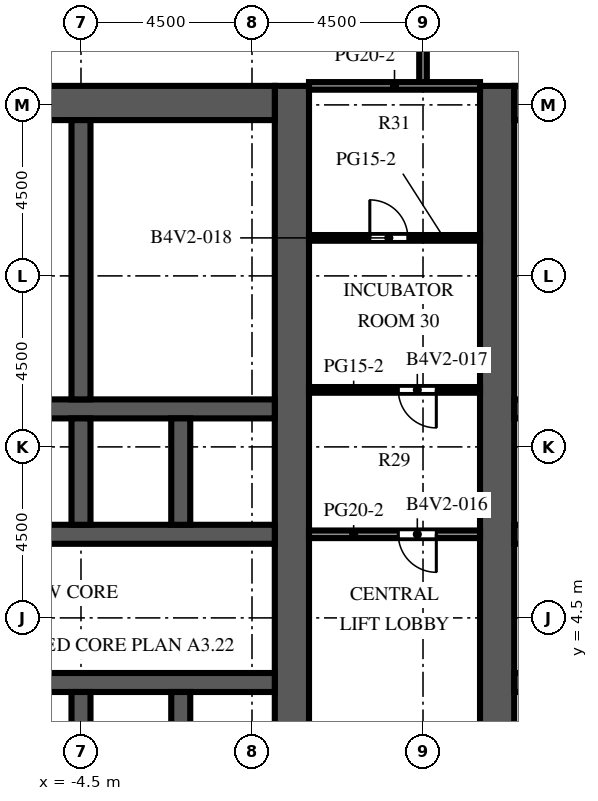
"""IFC4 building model, lengths in metres.
Left out: names, types, materials, properties, quantities, classifications, styles, units other than length and angle.
Written with IfcOpenShell. Run it as: python <this file> out.ifc"""

import sys

from ifc_helpers import new_model, si_unit, direction, frame, frame_2d, origin, place, context, subcontext, project, spatial, rectangle, extrude, element, fill, save


model = new_model("IFC4")
c1 = context("Model", 3, precision=1e-05, world=origin(), true_north=direction((0.0, 1.0)))
c2 = subcontext(c1, "Body", "Model", "MODEL_VIEW")
j1 = project(units=[si_unit("LENGTHUNIT", "METRE"), si_unit("PLANEANGLEUNIT", "RADIAN")], contexts=[c1])
p1 = place(None, origin())
s1 = spatial("IfcSite", under=j1, at=p1, CompositionType="ELEMENT")
p2 = place(p1, origin())
s2 = spatial("IfcBuilding", under=s1, at=p2, CompositionType="ELEMENT")
p3 = place(p2, frame((0.0, 0.0, 141.3)))
s3 = spatial("IfcBuildingStorey", under=s2, at=p3, CompositionType="ELEMENT", Elevation=141.3)
p4 = place(p3, frame((1.05, -9.0, 0.0), z_axis=(0.0, 0.0, 1.0), x_axis=(0.0, 1.0, 0.0)))
e1 = element("IfcWall", 1, at=p4, inside=s3, PredefinedType="SHEAR", context=c2, shape_type="SweptSolid", body=[
    extrude(rectangle(XDim=27.5, YDim=0.9, at=frame_2d((13.75, 0.0))), origin(), (0.0, 0.0, 1.0), 4.1),
])
p5 = place(p4, frame((12.55, 0.0, 0.0)))
e2 = element("IfcOpeningElement", 2, at=p5, cuts=e1, PredefinedType="OPENING", context=c2, shape_type="SweptSolid", body=[
    extrude(rectangle(XDim=2.4, YDim=2.4, at=frame_2d((1.2, 1.2))), frame((0.0, 0.46, 0.0), z_axis=(0.0, -1.0, 0.0), x_axis=(1.0, 0.0, 0.0)), (0.0, 0.0, 1.0), 0.92),
])
p6 = place(p4, frame((5.51, 0.0, 0.0)))
e3 = element("IfcOpeningElement", 3, at=p6, cuts=e1, PredefinedType="OPENING", context=c2, shape_type="SweptSolid", body=[
    extrude(rectangle(XDim=0.923, YDim=2.1, at=frame_2d((0.461, 1.05))), frame((0.0, 0.46, 0.0), z_axis=(0.0, -1.0, 0.0), x_axis=(1.0, 0.0, 0.0)), (0.0, 0.0, 1.0), 0.92),
])
p7 = place(p4, frame((23.427, 0.0, 0.0)))
e4 = element("IfcOpeningElement", 4, at=p7, cuts=e1, PredefinedType="OPENING", context=c2, shape_type="SweptSolid", body=[
    extrude(rectangle(XDim=1.2, YDim=2.1, at=frame_2d((0.6, 1.05))), frame((0.0, 0.46, 0.0), z_axis=(0.0, -1.0, 0.0), x_axis=(1.0, 0.0, 0.0)), (0.0, 0.0, 1.0), 0.92),
])
p8 = place(p3, frame((-9.6, 18.05, 0.0), z_axis=(0.0, 0.0, 1.0), x_axis=(1.0, 0.0, 0.0)))
e5 = element("IfcWall", 5, at=p8, inside=s3, PredefinedType="SHEAR", context=c2, shape_type="SweptSolid", body=[
    extrude(rectangle(XDim=10.2, YDim=0.9, at=frame_2d((5.1, 0.0))), origin(), (0.0, 0.0, 1.0), 4.1),
])
p9 = place(p3, frame((-9.6, 2.8, 0.0), z_axis=(0.0, 0.0, 1.0), x_axis=(1.0, 0.0, 0.0)))
e6 = element("IfcWall", 6, at=p9, inside=s3, PredefinedType="SHEAR", context=c2, shape_type="SweptSolid", body=[
    extrude(rectangle(XDim=10.2, YDim=0.5, at=frame_2d((5.1, 0.0))), origin(), (0.0, 0.0, 1.0), 4.1),
])
p10 = place(p9, frame((0.562, 0.0, 0.0)))
e7 = element("IfcOpeningElement", 7, at=p10, cuts=e6, PredefinedType="OPENING", context=c2, shape_type="SweptSolid", body=[
    extrude(rectangle(XDim=1.1, YDim=2.1, at=frame_2d((0.55, 1.05))), frame((0.0, 0.26, 0.0), z_axis=(0.0, -1.0, 0.0), x_axis=(1.0, 0.0, 0.0)), (0.0, 0.0, 1.0), 0.52),
])
p11 = place(p9, frame((3.238, 0.0, 0.0)))
e8 = element("IfcOpeningElement", 8, at=p11, cuts=e6, PredefinedType="OPENING", context=c2, shape_type="SweptSolid", body=[
    extrude(rectangle(XDim=1.1, YDim=2.1, at=frame_2d((0.55, 1.05))), frame((0.0, 0.26, 0.0), z_axis=(0.0, -1.0, 0.0), x_axis=(1.0, 0.0, 0.0)), (0.0, 0.0, 1.0), 0.52),
])
p12 = place(p9, frame((8.538, 0.0, 0.0)))
e9 = element("IfcOpeningElement", 9, at=p12, cuts=e6, PredefinedType="OPENING", context=c2, shape_type="SweptSolid", body=[
    extrude(rectangle(XDim=1.1, YDim=2.1, at=frame_2d((0.55, 1.05))), frame((0.0, 0.26, 0.0), z_axis=(0.0, -1.0, 0.0), x_axis=(1.0, 0.0, 0.0)), (0.0, 0.0, 1.0), 0.52),
])
p13 = place(p3, frame((-9.6, 6.7, 0.0), z_axis=(0.0, 0.0, 1.0), x_axis=(1.0, 0.0, 0.0)))
e10 = element("IfcWall", 10, at=p13, inside=s3, PredefinedType="SHEAR", context=c2, shape_type="SweptSolid", body=[
    extrude(rectangle(XDim=10.2, YDim=0.5, at=frame_2d((5.1, 0.0))), origin(), (0.0, 0.0, 1.0), 4.1),
])
p14 = place(p13, frame((0.562, 0.0, 0.0)))
e11 = element("IfcOpeningElement", 11, at=p14, cuts=e10, PredefinedType="OPENING", context=c2, shape_type="SweptSolid", body=[
    extrude(rectangle(XDim=1.1, YDim=2.1, at=frame_2d((0.55, 1.05))), frame((0.0, 0.26, 0.0), z_axis=(0.0, -1.0, 0.0), x_axis=(1.0, 0.0, 0.0)), (0.0, 0.0, 1.0), 0.52),
])
p15 = place(p13, frame((3.288, 0.0, 0.0)))
e12 = element("IfcOpeningElement", 12, at=p15, cuts=e10, PredefinedType="OPENING", context=c2, shape_type="SweptSolid", body=[
    extrude(rectangle(XDim=1.0, YDim=2.1, at=frame_2d((0.5, 1.05))), frame((0.0, 0.26, 0.0), z_axis=(0.0, -1.0, 0.0), x_axis=(1.0, 0.0, 0.0)), (0.0, 0.0, 1.0), 0.52),
])
p16 = place(p13, frame((5.913, 0.0, 0.0)))
e13 = element("IfcOpeningElement", 13, at=p16, cuts=e10, PredefinedType="OPENING", context=c2, shape_type="SweptSolid", body=[
    extrude(rectangle(XDim=1.0, YDim=2.1, at=frame_2d((0.5, 1.05))), frame((0.0, 0.26, 0.0), z_axis=(0.0, -1.0, 0.0), x_axis=(1.0, 0.0, 0.0)), (0.0, 0.0, 1.0), 0.52),
])
p17 = place(p13, frame((8.587, 0.0, 0.0)))
e14 = element("IfcOpeningElement", 14, at=p17, cuts=e10, PredefinedType="OPENING", context=c2, shape_type="SweptSolid", body=[
    extrude(rectangle(XDim=1.0, YDim=2.1, at=frame_2d((0.5, 1.05))), frame((0.0, 0.26, 0.0), z_axis=(0.0, -1.0, 0.0), x_axis=(1.0, 0.0, 0.0)), (0.0, 0.0, 1.0), 0.52),
])
p18 = place(p3, frame((-9.6, 10.0, 0.0), z_axis=(0.0, 0.0, 1.0), x_axis=(1.0, 0.0, 0.0)))
e15 = element("IfcWall", 15, at=p18, inside=s3, PredefinedType="SHEAR", context=c2, shape_type="SweptSolid", body=[
    extrude(rectangle(XDim=10.2, YDim=0.5, at=frame_2d((5.1, 0.0))), origin(), (0.0, 0.0, 1.0), 4.1),
])
for number, where, z_axis, x_axis in (
    (16, (-4.5, -0.25, 0.0), (0.0, 0.0, 1.0), (0.0, 1.0, 0.0)),
    (17, (-4.5, 6.95, 0.0), (0.0, 0.0, 1.0), (0.0, 1.0, 0.0)),
    (18, (-1.875, -0.25, 0.0), (0.0, 0.0, 1.0), (0.0, 1.0, 0.0)),
    (19, (-1.875, 6.95, 0.0), (0.0, 0.0, 1.0), (0.0, 1.0, 0.0)),
):
    element("IfcWall", number, at=place(p3, frame(where, z_axis=z_axis, x_axis=x_axis)), inside=s3, PredefinedType="SHEAR", context=c2, shape_type="SweptSolid", body=[
        extrude(rectangle(XDim=2.8, YDim=0.5, at=frame_2d((1.4, 0.0))), origin(), (0.0, 0.0, 1.0), 4.1),
    ])
p19 = place(p3, frame((-4.5, 10.25, 0.0), z_axis=(0.0, 0.0, 1.0), x_axis=(0.0, 1.0, 0.0)))
e20 = element("IfcWall", 20, at=p19, inside=s3, PredefinedType="SHEAR", context=c2, shape_type="SweptSolid", body=[
    extrude(rectangle(XDim=7.35, YDim=0.5, at=frame_2d((3.675, 0.0))), origin(), (0.0, 0.0, 1.0), 4.1),
])
p20 = place(p3, frame((6.45, -9.0, 0.0), z_axis=(0.0, 0.0, 1.0), x_axis=(0.0, 1.0, 0.0)))
e21 = element("IfcWall", 21, at=p20, inside=s3, PredefinedType="SHEAR", context=c2, shape_type="SweptSolid", body=[
    extrude(rectangle(XDim=27.5, YDim=0.9, at=frame_2d((13.75, 0.0))), origin(), (0.0, 0.0, 1.0), 4.1),
])
p21 = place(p20, frame((12.55, 0.0, 0.0)))
e22 = element("IfcOpeningElement", 22, at=p21, cuts=e21, PredefinedType="OPENING", context=c2, shape_type="SweptSolid", body=[
    extrude(rectangle(XDim=2.4, YDim=2.4, at=frame_2d((1.2, 1.2))), frame((0.0, 0.46, 0.0), z_axis=(0.0, -1.0, 0.0), x_axis=(1.0, 0.0, 0.0)), (0.0, 0.0, 1.0), 0.92),
])
p22 = place(p20, frame((5.51, 0.0, 0.0)))
e23 = element("IfcOpeningElement", 23, at=p22, cuts=e21, PredefinedType="OPENING", context=c2, shape_type="SweptSolid", body=[
    extrude(rectangle(XDim=0.923, YDim=2.1, at=frame_2d((0.461, 1.05))), frame((0.0, 0.46, 0.0), z_axis=(0.0, -1.0, 0.0), x_axis=(1.0, 0.0, 0.0)), (0.0, 0.0, 1.0), 0.92),
])
p23 = place(p20, frame((23.427, 0.0, 0.0)))
e24 = element("IfcOpeningElement", 24, at=p23, cuts=e21, PredefinedType="OPENING", context=c2, shape_type="SweptSolid", body=[
    extrude(rectangle(XDim=1.2, YDim=2.1, at=frame_2d((0.6, 1.05))), frame((0.0, 0.46, 0.0), z_axis=(0.0, -1.0, 0.0), x_axis=(1.0, 0.0, 0.0)), (0.0, 0.0, 1.0), 0.92),
])
p24 = place(p3, frame((6.9, 18.05, 0.0), z_axis=(0.0, 0.0, 1.0), x_axis=(1.0, 0.0, 0.0)))
e25 = element("IfcWall", 25, at=p24, inside=s3, PredefinedType="SHEAR", context=c2, shape_type="SweptSolid", body=[
    extrude(rectangle(XDim=10.2, YDim=0.9, at=frame_2d((5.1, 0.0))), origin(), (0.0, 0.0, 1.0), 4.1),
])
p25 = place(p3, frame((6.9, 2.8, 0.0), z_axis=(0.0, 0.0, 1.0), x_axis=(1.0, 0.0, 0.0)))
e26 = element("IfcWall", 26, at=p25, inside=s3, PredefinedType="SHEAR", context=c2, shape_type="SweptSolid", body=[
    extrude(rectangle(XDim=10.2, YDim=0.5, at=frame_2d((5.1, 0.0))), origin(), (0.0, 0.0, 1.0), 4.1),
])
p26 = place(p25, frame((0.562, 0.0, 0.0)))
e27 = element("IfcOpeningElement", 27, at=p26, cuts=e26, PredefinedType="OPENING", context=c2, shape_type="SweptSolid", body=[
    extrude(rectangle(XDim=1.1, YDim=2.1, at=frame_2d((0.55, 1.05))), frame((0.0, 0.26, 0.0), z_axis=(0.0, -1.0, 0.0), x_axis=(1.0, 0.0, 0.0)), (0.0, 0.0, 1.0), 0.52),
])
p27 = place(p25, frame((3.238, 0.0, 0.0)))
e28 = element("IfcOpeningElement", 28, at=p27, cuts=e26, PredefinedType="OPENING", context=c2, shape_type="SweptSolid", body=[
    extrude(rectangle(XDim=1.1, YDim=2.1, at=frame_2d((0.55, 1.05))), frame((0.0, 0.26, 0.0), z_axis=(0.0, -1.0, 0.0), x_axis=(1.0, 0.0, 0.0)), (0.0, 0.0, 1.0), 0.52),
])
p28 = place(p25, frame((8.538, 0.0, 0.0)))
e29 = element("IfcOpeningElement", 29, at=p28, cuts=e26, PredefinedType="OPENING", context=c2, shape_type="SweptSolid", body=[
    extrude(rectangle(XDim=1.1, YDim=2.1, at=frame_2d((0.55, 1.05))), frame((0.0, 0.26, 0.0), z_axis=(0.0, -1.0, 0.0), x_axis=(1.0, 0.0, 0.0)), (0.0, 0.0, 1.0), 0.52),
])
p29 = place(p3, frame((6.9, 6.7, 0.0), z_axis=(0.0, 0.0, 1.0), x_axis=(1.0, 0.0, 0.0)))
e30 = element("IfcWall", 30, at=p29, inside=s3, PredefinedType="SHEAR", context=c2, shape_type="SweptSolid", body=[
    extrude(rectangle(XDim=10.2, YDim=0.5, at=frame_2d((5.1, 0.0))), origin(), (0.0, 0.0, 1.0), 4.1),
])
p30 = place(p29, frame((0.562, 0.0, 0.0)))
e31 = element("IfcOpeningElement", 31, at=p30, cuts=e30, PredefinedType="OPENING", context=c2, shape_type="SweptSolid", body=[
    extrude(rectangle(XDim=1.1, YDim=2.1, at=frame_2d((0.55, 1.05))), frame((0.0, 0.26, 0.0), z_axis=(0.0, -1.0, 0.0), x_axis=(1.0, 0.0, 0.0)), (0.0, 0.0, 1.0), 0.52),
])
p31 = place(p29, frame((3.288, 0.0, 0.0)))
e32 = element("IfcOpeningElement", 32, at=p31, cuts=e30, PredefinedType="OPENING", context=c2, shape_type="SweptSolid", body=[
    extrude(rectangle(XDim=1.0, YDim=2.1, at=frame_2d((0.5, 1.05))), frame((0.0, 0.26, 0.0), z_axis=(0.0, -1.0, 0.0), x_axis=(1.0, 0.0, 0.0)), (0.0, 0.0, 1.0), 0.52),
])
p32 = place(p29, frame((5.913, 0.0, 0.0)))
e33 = element("IfcOpeningElement", 33, at=p32, cuts=e30, PredefinedType="OPENING", context=c2, shape_type="SweptSolid", body=[
    extrude(rectangle(XDim=1.0, YDim=2.1, at=frame_2d((0.5, 1.05))), frame((0.0, 0.26, 0.0), z_axis=(0.0, -1.0, 0.0), x_axis=(1.0, 0.0, 0.0)), (0.0, 0.0, 1.0), 0.52),
])
p33 = place(p29, frame((8.587, 0.0, 0.0)))
e34 = element("IfcOpeningElement", 34, at=p33, cuts=e30, PredefinedType="OPENING", context=c2, shape_type="SweptSolid", body=[
    extrude(rectangle(XDim=1.0, YDim=2.1, at=frame_2d((0.5, 1.05))), frame((0.0, 0.26, 0.0), z_axis=(0.0, -1.0, 0.0), x_axis=(1.0, 0.0, 0.0)), (0.0, 0.0, 1.0), 0.52),
])
p34 = place(p3, frame((6.9, 10.0, 0.0), z_axis=(0.0, 0.0, 1.0), x_axis=(1.0, 0.0, 0.0)))
e35 = element("IfcWall", 35, at=p34, inside=s3, PredefinedType="SHEAR", context=c2, shape_type="SweptSolid", body=[
    extrude(rectangle(XDim=10.2, YDim=0.5, at=frame_2d((5.1, 0.0))), origin(), (0.0, 0.0, 1.0), 4.1),
])
p35 = place(p3, frame((-0.7, 12.455, 0.0), z_axis=(0.0, 0.0, 1.0), x_axis=(1.0, 0.0, 0.0)))
e36 = element("IfcWall", 36, at=p35, inside=s3, PredefinedType="PARTITIONING", context=c2, shape_type="SweptSolid", body=[
    extrude(rectangle(XDim=1.3, YDim=0.1, at=frame_2d((0.65, 0.0))), origin(), (0.0, 0.0, 1.0), 3.5),
])
p36 = place(p35, frame((0.2, 0.0, 0.0)))
e37 = element("IfcOpeningElement", 37, at=p36, cuts=e36, PredefinedType="OPENING", context=c2, shape_type="SweptSolid", body=[
    extrude(rectangle(XDim=0.9, YDim=2.1, at=frame_2d((0.45, 1.05))), frame((0.0, 0.06, 0.0), z_axis=(0.0, -1.0, 0.0), x_axis=(1.0, 0.0, 0.0)), (0.0, 0.0, 1.0), 0.12),
])
p37 = place(p3, frame((-4.25, 12.455, 0.0), z_axis=(0.0, 0.0, 1.0), x_axis=(1.0, 0.0, 0.0)))
e38 = element("IfcWall", 38, at=p37, inside=s3, PredefinedType="PARTITIONING", context=c2, shape_type="SweptSolid", body=[
    extrude(rectangle(XDim=3.55, YDim=0.1, at=frame_2d((1.775, 0.0))), origin(), (0.0, 0.0, 1.0), 3.5),
])
p38 = place(p3, frame((-0.7, 12.455, 0.0), z_axis=(0.0, 0.0, 1.0), x_axis=(0.0, 1.0, 0.0)))
e39 = element("IfcWall", 39, at=p38, inside=s3, PredefinedType="PARTITIONING", context=c2, shape_type="SweptSolid", body=[
    extrude(rectangle(XDim=2.573, YDim=0.1, at=frame_2d((1.286, 0.0))), origin(), (0.0, 0.0, 1.0), 3.5),
])
p39 = place(p38, frame((0.786, 0.0, 0.0)))
e40 = element("IfcOpeningElement", 40, at=p39, cuts=e39, PredefinedType="OPENING", context=c2, shape_type="SweptSolid", body=[
    extrude(rectangle(XDim=1.0, YDim=2.1, at=frame_2d((0.5, 1.05))), frame((0.0, 0.06, 0.0), z_axis=(0.0, -1.0, 0.0), x_axis=(1.0, 0.0, 0.0)), (0.0, 0.0, 1.0), 0.12),
])
p40 = place(p3, frame((-0.7, 15.028, 0.0), z_axis=(0.0, 0.0, 1.0), x_axis=(0.0, 1.0, 0.0)))
e41 = element("IfcWall", 41, at=p40, inside=s3, PredefinedType="PARTITIONING", context=c2, shape_type="SweptSolid", body=[
    extrude(rectangle(XDim=2.573, YDim=0.1, at=frame_2d((1.286, 0.0))), origin(), (0.0, 0.0, 1.0), 3.5),
])
p41 = place(p40, frame((0.786, 0.0, 0.0)))
e42 = element("IfcOpeningElement", 42, at=p41, cuts=e41, PredefinedType="OPENING", context=c2, shape_type="SweptSolid", body=[
    extrude(rectangle(XDim=1.0, YDim=2.1, at=frame_2d((0.5, 1.05))), frame((0.0, 0.06, 0.0), z_axis=(0.0, -1.0, 0.0), x_axis=(1.0, 0.0, 0.0)), (0.0, 0.0, 1.0), 0.12),
])
p42 = place(p3, frame((-4.25, 15.028, 0.0), z_axis=(0.0, 0.0, 1.0), x_axis=(1.0, 0.0, 0.0)))
e43 = element("IfcWall", 43, at=p42, inside=s3, PredefinedType="PARTITIONING", context=c2, shape_type="SweptSolid", body=[
    extrude(rectangle(XDim=3.55, YDim=0.1, at=frame_2d((1.775, 0.0))), origin(), (0.0, 0.0, 1.0), 3.5),
])
p43 = place(p3, frame((6.9, 12.455, 0.0), z_axis=(0.0, 0.0, 1.0), x_axis=(1.0, 0.0, 0.0)))
e44 = element("IfcWall", 44, at=p43, inside=s3, PredefinedType="PARTITIONING", context=c2, shape_type="SweptSolid", body=[
    extrude(rectangle(XDim=1.3, YDim=0.1, at=frame_2d((0.65, 0.0))), origin(), (0.0, 0.0, 1.0), 3.5),
])
p44 = place(p43, frame((0.2, 0.0, 0.0)))
e45 = element("IfcOpeningElement", 45, at=p44, cuts=e44, PredefinedType="OPENING", context=c2, shape_type="SweptSolid", body=[
    extrude(rectangle(XDim=0.9, YDim=2.1, at=frame_2d((0.45, 1.05))), frame((0.0, 0.06, 0.0), z_axis=(0.0, -1.0, 0.0), x_axis=(1.0, 0.0, 0.0)), (0.0, 0.0, 1.0), 0.12),
])
p45 = place(p3, frame((4.5, 18.5, 0.0), z_axis=(0.0, 0.0, 1.0), x_axis=(0.0, 1.0, 0.0)))
e46 = element("IfcWall", 46, at=p45, inside=s3, PredefinedType="PARTITIONING", context=c2, shape_type="SweptSolid", body=[
    extrude(rectangle(XDim=12.4, YDim=0.2, at=frame_2d((6.2, 0.0))), origin(), (0.0, 0.0, 1.0), 3.5),
])
p46 = place(p3, frame((1.5, 6.7, 0.0), z_axis=(0.0, 0.0, 1.0), x_axis=(1.0, 0.0, 0.0)))
e47 = element("IfcWall", 47, at=p46, inside=s3, PredefinedType="PARTITIONING", context=c2, shape_type="SweptSolid", body=[
    extrude(rectangle(XDim=4.5, YDim=0.2, at=frame_2d((2.25, 0.0))), origin(), (0.0, 0.0, 1.0), 3.5),
])
p47 = place(p46, frame((2.35, 0.0, 0.0)))
e48 = element("IfcOpeningElement", 48, at=p47, cuts=e47, PredefinedType="OPENING", context=c2, shape_type="SweptSolid", body=[
    extrude(rectangle(XDim=1.0, YDim=2.1, at=frame_2d((0.5, 1.05))), frame((0.0, 0.11, 0.0), z_axis=(0.0, -1.0, 0.0), x_axis=(1.0, 0.0, 0.0)), (0.0, 0.0, 1.0), 0.22),
])
p48 = place(p3, frame((1.5, 10.5, 0.0), z_axis=(0.0, 0.0, 1.0), x_axis=(1.0, 0.0, 0.0)))
e49 = element("IfcWall", 49, at=p48, inside=s3, PredefinedType="PARTITIONING", context=c2, shape_type="SweptSolid", body=[
    extrude(rectangle(XDim=4.5, YDim=0.15, at=frame_2d((2.25, 0.0))), origin(), (0.0, 0.0, 1.0), 3.5),
])
p49 = place(p48, frame((2.35, 0.0, 0.0)))
e50 = element("IfcOpeningElement", 50, at=p49, cuts=e49, PredefinedType="OPENING", context=c2, shape_type="SweptSolid", body=[
    extrude(rectangle(XDim=1.0, YDim=2.1, at=frame_2d((0.5, 1.05))), frame((0.0, 0.085, 0.0), z_axis=(0.0, -1.0, 0.0), x_axis=(1.0, 0.0, 0.0)), (0.0, 0.0, 1.0), 0.17),
])
p50 = place(p3, frame((1.5, 14.5, 0.0), z_axis=(0.0, 0.0, 1.0), x_axis=(1.0, 0.0, 0.0)))
e51 = element("IfcWall", 51, at=p50, inside=s3, PredefinedType="PARTITIONING", context=c2, shape_type="SweptSolid", body=[
    extrude(rectangle(XDim=4.5, YDim=0.15, at=frame_2d((2.25, 0.0))), origin(), (0.0, 0.0, 1.0), 3.5),
])
p51 = place(p50, frame((1.6, 0.0, 0.0)))
e52 = element("IfcOpeningElement", 52, at=p51, cuts=e51, PredefinedType="OPENING", context=c2, shape_type="SweptSolid", body=[
    extrude(rectangle(XDim=1.0, YDim=2.1, at=frame_2d((0.5, 1.05))), frame((0.0, 0.085, 0.0), z_axis=(0.0, -1.0, 0.0), x_axis=(1.0, 0.0, 0.0)), (0.0, 0.0, 1.0), 0.17),
])
p52 = place(p3, frame((1.5, 18.5, 0.0), z_axis=(0.0, 0.0, 1.0), x_axis=(1.0, 0.0, 0.0)))
e53 = element("IfcWall", 53, at=p52, inside=s3, PredefinedType="PARTITIONING", context=c2, shape_type="SweptSolid", body=[
    extrude(rectangle(XDim=4.5, YDim=0.2, at=frame_2d((2.25, 0.0))), origin(), (0.0, 0.0, 1.0), 3.5),
])
p53 = place(p12, origin())
e54 = element("IfcDoor", 54, at=p53, inside=s3, OperationType="DOUBLE_DOOR_SLIDING", PredefinedType="DOOR", context=c2, shape_type="SweptSolid", body=[
    extrude(rectangle(XDim=1.1, YDim=2.1, at=frame_2d((0.55, 1.05))), frame((0.0, 0.025, 0.0), z_axis=(0.0, -1.0, 0.0), x_axis=(1.0, 0.0, 0.0)), (0.0, 0.0, 1.0), 0.05),
])
fill(e9, e54)
p54 = place(p5, origin())
e55 = element("IfcDoor", 55, at=p54, inside=s3, OperationType="DOUBLE_DOOR_DOUBLE_SWING", PredefinedType="DOOR", context=c2, shape_type="SweptSolid", body=[
    extrude(rectangle(XDim=2.4, YDim=2.4, at=frame_2d((1.2, 1.2))), frame((0.0, 0.025, 0.0), z_axis=(0.0, -1.0, 0.0), x_axis=(1.0, 0.0, 0.0)), (0.0, 0.0, 1.0), 0.05),
])
fill(e2, e55)
p55 = place(p21, origin())
e56 = element("IfcDoor", 56, at=p55, inside=s3, OperationType="DOUBLE_DOOR_DOUBLE_SWING", PredefinedType="DOOR", context=c2, shape_type="SweptSolid", body=[
    extrude(rectangle(XDim=2.4, YDim=2.4, at=frame_2d((1.2, 1.2))), frame((0.0, 0.025, 0.0), z_axis=(0.0, -1.0, 0.0), x_axis=(1.0, 0.0, 0.0)), (0.0, 0.0, 1.0), 0.05),
])
fill(e22, e56)
p56 = place(p16, origin())
e57 = element("IfcDoor", 57, at=p56, inside=s3, OperationType="SINGLE_SWING_LEFT", PredefinedType="DOOR", context=c2, shape_type="SweptSolid", body=[
    extrude(rectangle(XDim=1.0, YDim=2.1, at=frame_2d((0.5, 1.05))), frame((0.0, 0.025, 0.0), z_axis=(0.0, -1.0, 0.0), x_axis=(1.0, 0.0, 0.0)), (0.0, 0.0, 1.0), 0.05),
])
fill(e13, e57)
p57 = place(p17, origin())
e58 = element("IfcDoor", 58, at=p57, inside=s3, OperationType="SINGLE_SWING_RIGHT", PredefinedType="DOOR", context=c2, shape_type="SweptSolid", body=[
    extrude(rectangle(XDim=1.0, YDim=2.1, at=frame_2d((0.5, 1.05))), frame((0.0, 0.025, 0.0), z_axis=(0.0, -1.0, 0.0), x_axis=(1.0, 0.0, 0.0)), (0.0, 0.0, 1.0), 0.05),
])
fill(e14, e58)
p58 = place(p36, origin())
e59 = element("IfcDoor", 59, at=p58, inside=s3, OperationType="SINGLE_SWING_LEFT", PredefinedType="DOOR", context=c2, shape_type="SweptSolid", body=[
    extrude(rectangle(XDim=0.9, YDim=2.1, at=frame_2d((0.45, 1.05))), frame((0.0, 0.025, 0.0), z_axis=(0.0, -1.0, 0.0), x_axis=(1.0, 0.0, 0.0)), (0.0, 0.0, 1.0), 0.05),
])
fill(e37, e59)
p59 = place(p7, origin())
e60 = element("IfcDoor", 60, at=p59, inside=s3, OperationType="SINGLE_SWING_RIGHT", PredefinedType="DOOR", context=c2, shape_type="SweptSolid", body=[
    extrude(rectangle(XDim=1.2, YDim=2.1, at=frame_2d((0.6, 1.05))), frame((0.0, 0.425, 0.0), z_axis=(0.0, -1.0, 0.0), x_axis=(1.0, 0.0, 0.0)), (0.0, 0.0, 1.0), 0.05),
])
fill(e4, e60)
p60 = place(p39, origin())
e61 = element("IfcDoor", 61, at=p60, inside=s3, OperationType="SINGLE_SWING_LEFT", PredefinedType="DOOR", context=c2, shape_type="SweptSolid", body=[
    extrude(rectangle(XDim=1.0, YDim=2.1, at=frame_2d((0.5, 1.05))), frame((0.0, 0.025, 0.0), z_axis=(0.0, -1.0, 0.0), x_axis=(1.0, 0.0, 0.0)), (0.0, 0.0, 1.0), 0.05),
])
fill(e40, e61)
p61 = place(p41, origin())
e62 = element("IfcDoor", 62, at=p61, inside=s3, OperationType="SINGLE_SWING_RIGHT", PredefinedType="DOOR", context=c2, shape_type="SweptSolid", body=[
    extrude(rectangle(XDim=1.0, YDim=2.1, at=frame_2d((0.5, 1.05))), frame((0.0, 0.025, 0.0), z_axis=(0.0, -1.0, 0.0), x_axis=(1.0, 0.0, 0.0)), (0.0, 0.0, 1.0), 0.05),
])
fill(e42, e62)
p62 = place(p23, origin())
e63 = element("IfcDoor", 63, at=p62, inside=s3, OperationType="SINGLE_SWING_LEFT", PredefinedType="DOOR", context=c2, shape_type="SweptSolid", body=[
    extrude(rectangle(XDim=1.2, YDim=2.1, at=frame_2d((0.6, 1.05))), frame((0.0, -0.375, 0.0), z_axis=(0.0, -1.0, 0.0), x_axis=(1.0, 0.0, 0.0)), (0.0, 0.0, 1.0), 0.05),
])
fill(e24, e63)
p63 = place(p47, origin())
e64 = element("IfcDoor", 64, at=p63, inside=s3, OperationType="SINGLE_SWING_RIGHT", PredefinedType="DOOR", context=c2, shape_type="SweptSolid", body=[
    extrude(rectangle(XDim=1.0, YDim=2.1, at=frame_2d((0.5, 1.05))), frame((0.0, 0.025, 0.0), z_axis=(0.0, -1.0, 0.0), x_axis=(1.0, 0.0, 0.0)), (0.0, 0.0, 1.0), 0.05),
])
fill(e48, e64)
p64 = place(p49, origin())
e65 = element("IfcDoor", 65, at=p64, inside=s3, OperationType="SINGLE_SWING_RIGHT", PredefinedType="DOOR", context=c2, shape_type="SweptSolid", body=[
    extrude(rectangle(XDim=1.0, YDim=2.1, at=frame_2d((0.5, 1.05))), frame((0.0, 0.025, 0.0), z_axis=(0.0, -1.0, 0.0), x_axis=(1.0, 0.0, 0.0)), (0.0, 0.0, 1.0), 0.05),
])
fill(e50, e65)
p65 = place(p51, origin())
e66 = element("IfcDoor", 66, at=p65, inside=s3, OperationType="SINGLE_SWING_LEFT", PredefinedType="DOOR", context=c2, shape_type="SweptSolid", body=[
    extrude(rectangle(XDim=1.0, YDim=2.1, at=frame_2d((0.5, 1.05))), frame((0.0, 0.025, 0.0), z_axis=(0.0, -1.0, 0.0), x_axis=(1.0, 0.0, 0.0)), (0.0, 0.0, 1.0), 0.05),
])
fill(e52, e66)
save(model, sys.argv[1])
